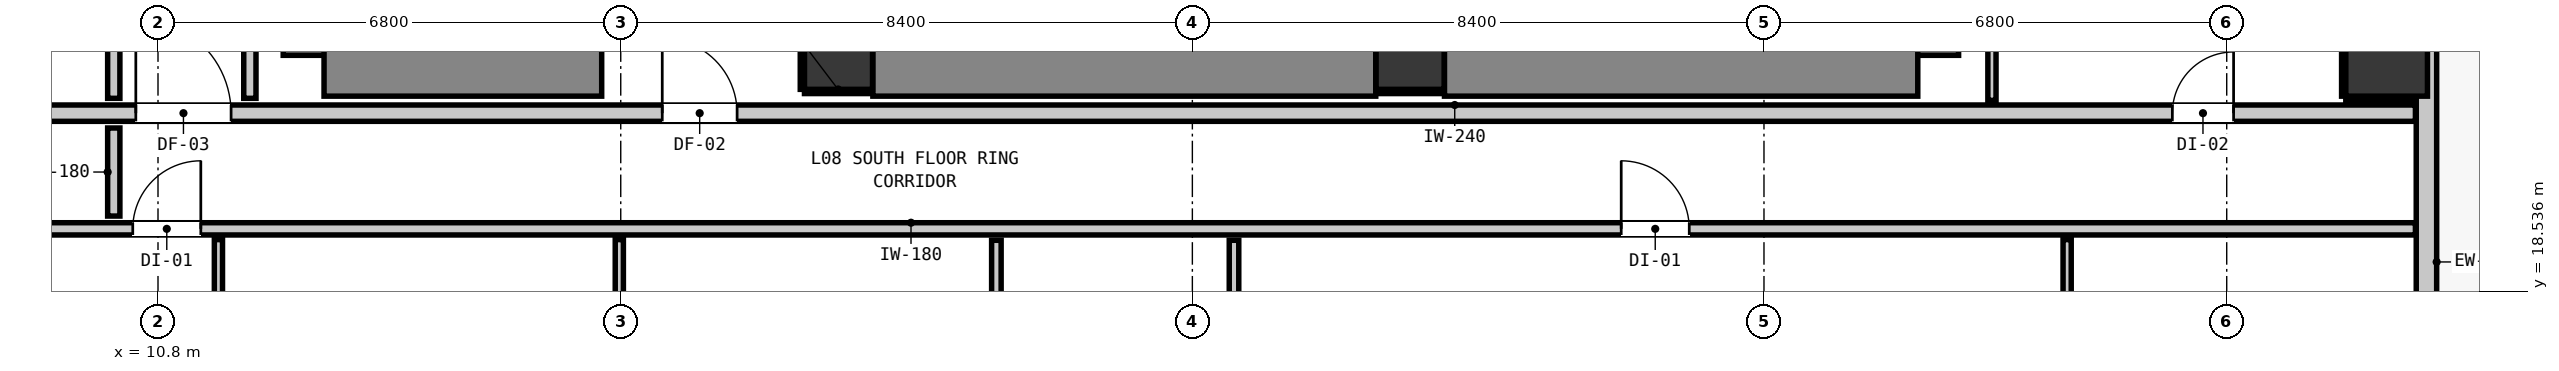
"""IFC4 building model, lengths in metres.
Left out: names, types, materials, properties, quantities, classifications, styles, units other than length and angle.
Written with IfcOpenShell. Run it as: python <this file> out.ifc"""

import sys

from ifc_helpers import new_model, si_unit, direction, frame, frame_2d, origin, origin_2d, place, context, subcontext, project, spatial, rectangle, extrude, element, fill, save


model = new_model("IFC4")
c1 = context("Model", 3, precision=1e-05, world=origin(), true_north=direction((0.0, 1.0)))
c2 = subcontext(c1, "Body", "Model", "MODEL_VIEW")
j1 = project(units=[si_unit("LENGTHUNIT", "METRE"), si_unit("PLANEANGLEUNIT", "RADIAN")], contexts=[c1])
p1 = place(None, origin())
s1 = spatial("IfcSite", under=j1, at=p1, CompositionType="ELEMENT")
p2 = place(p1, origin())
s2 = spatial("IfcBuilding", under=s1, at=p2, CompositionType="ELEMENT")
p3 = place(p2, frame((0.0, 0.0, 31.96)))
s3 = spatial("IfcBuildingStorey", under=s2, at=p3, CompositionType="ELEMENT", Elevation=31.96)
for number, where, z_axis, x_axis in (
    (1, (20.8, 22.0, 0.0), (0.0, 0.0, 1.0), (1.0, 0.0, 0.0)),
    (2, (29.2, 22.0, 0.0), (0.0, 0.0, 1.0), (1.0, 0.0, 0.0)),
):
    element("IfcColumn", number, at=place(p3, frame(where, z_axis=z_axis, x_axis=x_axis)), inside=s3, PredefinedType="COLUMN", context=c2, shape_type="SweptSolid", body=[
        extrude(rectangle(XDim=1.0, YDim=1.0, at=origin_2d()), origin(), (0.0, 0.0, 1.0), 3.32),
    ])
p4 = place(p3, frame((13.24, 22.0, 0.0), z_axis=(0.0, 0.0, 1.0), x_axis=(0.0, 1.0, 0.0)))
e3 = element("IfcWall", 3, at=p4, inside=s3, PredefinedType="SHEAR", context=c2, shape_type="SweptSolid", body=[
    extrude(rectangle(XDim=8.195, YDim=1.2, at=frame_2d((4.098, 0.0))), origin(), (0.0, 0.0, 1.0), 3.32),
])
p5 = place(p3, frame((13.24, 22.0, 0.0), z_axis=(0.0, 0.0, 1.0), x_axis=(1.0, 0.0, 0.0)))
e4 = element("IfcWall", 4, at=p5, inside=s3, PredefinedType="SHEAR", context=c2, shape_type="SweptSolid", body=[
    extrude(rectangle(XDim=4.08, YDim=1.2, at=frame_2d((2.04, 0.0))), origin(), (0.0, 0.0, 1.0), 3.32),
])
p6 = place(p3, frame((36.66, 22.0, 0.0), z_axis=(0.0, 0.0, 1.0), x_axis=(0.0, 1.0, 0.0)))
e5 = element("IfcWall", 5, at=p6, inside=s3, PredefinedType="SHEAR", context=c2, shape_type="SweptSolid", body=[
    extrude(rectangle(XDim=8.195, YDim=1.2, at=frame_2d((4.098, 0.0))), origin(), (0.0, 0.0, 1.0), 3.32),
])
p7 = place(p3, frame((29.705, 22.0, 0.0), z_axis=(0.0, 0.0, 1.0), x_axis=(1.0, 0.0, 0.0)))
e6 = element("IfcWall", 6, at=p7, inside=s3, PredefinedType="SHEAR", context=c2, shape_type="SweptSolid", body=[
    extrude(rectangle(XDim=6.955, YDim=1.2, at=frame_2d((3.478, 0.0))), origin(), (0.0, 0.0, 1.0), 3.32),
])
p8 = place(p3, frame((21.305, 22.0, 0.0), z_axis=(0.0, 0.0, 1.0), x_axis=(1.0, 0.0, 0.0)))
e7 = element("IfcWall", 7, at=p8, inside=s3, PredefinedType="SHEAR", context=c2, shape_type="SweptSolid", body=[
    extrude(rectangle(XDim=7.39, YDim=1.2, at=frame_2d((3.695, 0.0))), origin(), (0.0, 0.0, 1.0), 3.32),
])
p9 = place(p3, frame((43.55, 22.0, 0.0), z_axis=(0.0, 0.0, 1.0), x_axis=(1.0, 0.0, 0.0)))
e8 = element("IfcColumn", 8, at=p9, inside=s3, PredefinedType="COLUMN", context=c2, shape_type="SweptSolid", body=[
    extrude(rectangle(XDim=1.2, YDim=1.2, at=origin_2d()), origin(), (0.0, 0.0, 1.0), 3.32),
])
p10 = place(p3, frame((44.135, 44.835, 0.0), z_axis=(0.0, 0.0, 1.0), x_axis=(0.0, -1.0, 0.0)))
e9 = element("IfcWall", 9, at=p10, inside=s3, PredefinedType="STANDARD", context=c2, shape_type="SweptSolid", body=[
    extrude(rectangle(XDim=34.67, YDim=0.3, at=frame_2d((17.335, 0.0))), origin(), (0.0, 0.0, 1.0), 3.06),
])
p11 = place(p10, frame((1.251, 0.0, 0.0)))
e10 = element("IfcOpeningElement", 10, at=p11, cuts=e9, PredefinedType="OPENING", context=c2, shape_type="SweptSolid", body=[
    extrude(rectangle(XDim=1.0, YDim=2.15, at=frame_2d((0.5, 1.075))), frame((0.0, 0.16, 0.0), z_axis=(0.0, -1.0, 0.0), x_axis=(1.0, 0.0, 0.0)), (0.0, 0.0, 1.0), 0.32),
])
p12 = place(p10, frame((32.583, 0.0, 0.85)))
e11 = element("IfcOpeningElement", 11, at=p12, cuts=e9, PredefinedType="OPENING", context=c2, shape_type="SweptSolid", body=[
    extrude(rectangle(XDim=1.35, YDim=1.85, at=frame_2d((0.675, 0.925))), frame((0.0, 0.16, 0.0), z_axis=(0.0, -1.0, 0.0), x_axis=(1.0, 0.0, 0.0)), (0.0, 0.0, 1.0), 0.32),
])
p13 = place(p10, frame((17.81, 0.0, 0.85)))
e12 = element("IfcOpeningElement", 12, at=p13, cuts=e9, PredefinedType="OPENING", context=c2, shape_type="SweptSolid", body=[
    extrude(rectangle(XDim=1.35, YDim=1.85, at=frame_2d((0.675, 0.925))), frame((0.0, 0.16, 0.0), z_axis=(0.0, -1.0, 0.0), x_axis=(1.0, 0.0, 0.0)), (0.0, 0.0, 1.0), 0.32),
])
p14 = place(p10, frame((6.834, 0.0, 0.85)))
e13 = element("IfcOpeningElement", 13, at=p14, cuts=e9, PredefinedType="OPENING", context=c2, shape_type="SweptSolid", body=[
    extrude(rectangle(XDim=1.35, YDim=1.85, at=frame_2d((0.675, 0.925))), frame((0.0, 0.16, 0.0), z_axis=(0.0, -1.0, 0.0), x_axis=(1.0, 0.0, 0.0)), (0.0, 0.0, 1.0), 0.32),
])
p15 = place(p3, frame((1.827, 21.15, 0.0), z_axis=(0.0, 0.0, 1.0), x_axis=(1.0, 0.0, 0.0)))
e14 = element("IfcWall", 14, at=p15, inside=s3, PredefinedType="PARTITIONING", context=c2, shape_type="SweptSolid", body=[
    extrude(rectangle(XDim=42.146, YDim=0.24, at=frame_2d((21.073, 0.0))), origin(), (0.0, 0.0, 1.0), 3.06),
])
p16 = place(p15, frame((16.383, 0.0, 0.0)))
e15 = element("IfcOpeningElement", 15, at=p16, cuts=e14, PredefinedType="OPENING", context=c2, shape_type="SweptSolid", body=[
    extrude(rectangle(XDim=1.1, YDim=2.15, at=frame_2d((0.55, 1.075))), frame((0.0, 0.13, 0.0), z_axis=(0.0, -1.0, 0.0), x_axis=(1.0, 0.0, 0.0)), (0.0, 0.0, 1.0), 0.26),
])
p17 = place(p15, frame((8.647, 0.0, 0.0)))
e16 = element("IfcOpeningElement", 16, at=p17, cuts=e14, PredefinedType="OPENING", context=c2, shape_type="SweptSolid", body=[
    extrude(rectangle(XDim=1.4, YDim=2.15, at=frame_2d((0.7, 1.075))), frame((0.0, 0.13, 0.0), z_axis=(0.0, -1.0, 0.0), x_axis=(1.0, 0.0, 0.0)), (0.0, 0.0, 1.0), 0.26),
])
p18 = place(p15, frame((38.574, 0.0, 0.0)))
e17 = element("IfcOpeningElement", 17, at=p18, cuts=e14, PredefinedType="OPENING", context=c2, shape_type="SweptSolid", body=[
    extrude(rectangle(XDim=0.9, YDim=2.1, at=frame_2d((0.45, 1.05))), frame((0.0, 0.13, 0.0), z_axis=(0.0, -1.0, 0.0), x_axis=(1.0, 0.0, 0.0)), (0.0, 0.0, 1.0), 0.26),
])
p19 = place(p3, frame((1.827, 19.45, 0.0), z_axis=(0.0, 0.0, 1.0), x_axis=(1.0, 0.0, 0.0)))
e18 = element("IfcWall", 18, at=p19, inside=s3, PredefinedType="PARTITIONING", context=c2, shape_type="SweptSolid", body=[
    extrude(rectangle(XDim=42.146, YDim=0.18, at=frame_2d((21.073, 0.0))), origin(), (0.0, 0.0, 1.0), 3.06),
])
p20 = place(p19, frame((8.602, 0.0, 0.0)))
e19 = element("IfcOpeningElement", 19, at=p20, cuts=e18, PredefinedType="OPENING", context=c2, shape_type="SweptSolid", body=[
    extrude(rectangle(XDim=1.0, YDim=2.15, at=frame_2d((0.5, 1.075))), frame((0.0, 0.1, 0.0), z_axis=(0.0, -1.0, 0.0), x_axis=(1.0, 0.0, 0.0)), (0.0, 0.0, 1.0), 0.2),
])
p21 = place(p19, frame((30.475, 0.0, 0.0)))
e20 = element("IfcOpeningElement", 20, at=p21, cuts=e18, PredefinedType="OPENING", context=c2, shape_type="SweptSolid", body=[
    extrude(rectangle(XDim=1.0, YDim=2.15, at=frame_2d((0.5, 1.075))), frame((0.0, 0.1, 0.0), z_axis=(0.0, -1.0, 0.0), x_axis=(1.0, 0.0, 0.0)), (0.0, 0.0, 1.0), 0.2),
])
p22 = place(p3, frame((10.15, 19.638, 0.0), z_axis=(0.0, 0.0, 1.0), x_axis=(0.0, 1.0, 0.0)))
e21 = element("IfcWall", 21, at=p22, inside=s3, PredefinedType="PARTITIONING", context=c2, shape_type="SweptSolid", body=[
    extrude(rectangle(XDim=1.294, YDim=0.18, at=frame_2d((0.647, 0.0))), origin(), (0.0, 0.0, 1.0), 3.06),
])
p23 = place(p3, frame((10.15, 21.368, 0.0), z_axis=(0.0, 0.0, 1.0), x_axis=(0.0, 1.0, 0.0)))
e22 = element("IfcWall", 22, at=p23, inside=s3, PredefinedType="PARTITIONING", context=c2, shape_type="SweptSolid", body=[
    extrude(rectangle(XDim=5.354, YDim=0.18, at=frame_2d((2.677, 0.0))), origin(), (0.0, 0.0, 1.0), 3.06),
])
p24 = place(p3, frame((12.15, 21.368, 0.0), z_axis=(0.0, 0.0, 1.0), x_axis=(0.0, 1.0, 0.0)))
e23 = element("IfcWall", 23, at=p24, inside=s3, PredefinedType="PARTITIONING", context=c2, shape_type="SweptSolid", body=[
    extrude(rectangle(XDim=18.694, YDim=0.18, at=frame_2d((9.347, 0.0))), origin(), (0.0, 0.0, 1.0), 3.06),
])
p25 = place(p3, frame((23.12, 13.148, 0.0), z_axis=(0.0, 0.0, 1.0), x_axis=(0.0, 1.0, 0.0)))
e24 = element("IfcWall", 24, at=p25, inside=s3, PredefinedType="PARTITIONING", context=c2, shape_type="SweptSolid", body=[
    extrude(rectangle(XDim=6.134, YDim=0.14, at=frame_2d((3.067, 0.0))), origin(), (0.0, 0.0, 1.0), 3.06),
])
p26 = place(p3, frame((26.612, 13.148, 0.0), z_axis=(0.0, 0.0, 1.0), x_axis=(0.0, 1.0, 0.0)))
e25 = element("IfcWall", 25, at=p26, inside=s3, PredefinedType="PARTITIONING", context=c2, shape_type="SweptSolid", body=[
    extrude(rectangle(XDim=6.134, YDim=0.14, at=frame_2d((3.067, 0.0))), origin(), (0.0, 0.0, 1.0), 3.06),
])
p27 = place(p26, frame((2.647, 0.0, 0.0)))
e26 = element("IfcOpeningElement", 26, at=p27, cuts=e25, PredefinedType="OPENING", context=c2, shape_type="SweptSolid", body=[
    extrude(rectangle(XDim=0.86, YDim=2.02, at=frame_2d((0.43, 1.01))), frame((0.0, 0.08, 0.0), z_axis=(0.0, -1.0, 0.0), x_axis=(1.0, 0.0, 0.0)), (0.0, 0.0, 1.0), 0.16),
])
p28 = place(p3, frame((11.688, 13.138, 0.0), z_axis=(0.0, 0.0, 1.0), x_axis=(0.0, 1.0, 0.0)))
e27 = element("IfcWall", 27, at=p28, inside=s3, PredefinedType="PARTITIONING", context=c2, shape_type="SweptSolid", body=[
    extrude(rectangle(XDim=6.154, YDim=0.12, at=frame_2d((3.077, 0.0))), origin(), (0.0, 0.0, 1.0), 3.06),
])
p29 = place(p28, frame((2.624, 0.0, 0.0)))
e28 = element("IfcOpeningElement", 28, at=p29, cuts=e27, PredefinedType="OPENING", context=c2, shape_type="SweptSolid", body=[
    extrude(rectangle(XDim=0.9, YDim=2.1, at=frame_2d((0.45, 1.05))), frame((0.0, 0.07, 0.0), z_axis=(0.0, -1.0, 0.0), x_axis=(1.0, 0.0, 0.0)), (0.0, 0.0, 1.0), 0.14),
])
p30 = place(p3, frame((17.579, 13.138, 0.0), z_axis=(0.0, 0.0, 1.0), x_axis=(0.0, 1.0, 0.0)))
e29 = element("IfcWall", 29, at=p30, inside=s3, PredefinedType="PARTITIONING", context=c2, shape_type="SweptSolid", body=[
    extrude(rectangle(XDim=6.154, YDim=0.12, at=frame_2d((3.077, 0.0))), origin(), (0.0, 0.0, 1.0), 3.06),
])
p31 = place(p30, frame((2.637, 0.0, 0.0)))
e30 = element("IfcOpeningElement", 30, at=p31, cuts=e29, PredefinedType="OPENING", context=c2, shape_type="SweptSolid", body=[
    extrude(rectangle(XDim=0.9, YDim=2.1, at=frame_2d((0.45, 1.05))), frame((0.0, 0.07, 0.0), z_axis=(0.0, -1.0, 0.0), x_axis=(1.0, 0.0, 0.0)), (0.0, 0.0, 1.0), 0.14),
])
p32 = place(p3, frame((37.75, 21.338, 0.0), z_axis=(0.0, 0.0, 1.0), x_axis=(0.0, 1.0, 0.0)))
e31 = element("IfcWall", 31, at=p32, inside=s3, PredefinedType="PARTITIONING", context=c2, shape_type="SweptSolid", body=[
    extrude(rectangle(XDim=10.124, YDim=0.12, at=frame_2d((5.062, 0.0))), origin(), (0.0, 0.0, 1.0), 3.06),
])
p33 = place(p3, frame((38.855, 13.138, 0.0), z_axis=(0.0, 0.0, 1.0), x_axis=(0.0, 1.0, 0.0)))
e32 = element("IfcWall", 32, at=p33, inside=s3, PredefinedType="PARTITIONING", context=c2, shape_type="SweptSolid", body=[
    extrude(rectangle(XDim=6.154, YDim=0.12, at=frame_2d((3.077, 0.0))), origin(), (0.0, 0.0, 1.0), 2.445),
])
p34 = place(p33, frame((2.637, 0.0, 0.0)))
e33 = element("IfcOpeningElement", 33, at=p34, cuts=e32, PredefinedType="OPENING", context=c2, shape_type="SweptSolid", body=[
    extrude(rectangle(XDim=0.9, YDim=2.1, at=frame_2d((0.45, 1.05))), frame((0.0, 0.07, 0.0), z_axis=(0.0, -1.0, 0.0), x_axis=(1.0, 0.0, 0.0)), (0.0, 0.0, 1.0), 0.14),
])
p35 = place(p3, frame((20.3, 21.468, 0.0), z_axis=(0.0, 0.0, 1.0), x_axis=(1.0, 0.0, 0.0)))
e34 = element("IfcWall", 34, at=p35, inside=s3, PredefinedType="PARTITIONING", context=c2, shape_type="SweptSolid", body=[
    extrude(rectangle(XDim=0.99, YDim=0.06, at=frame_2d((0.495, 0.0))), origin(), (0.0, 0.0, 1.0), 1.45),
])
p36 = place(p3, frame((20.268, 21.5, 0.0), z_axis=(0.0, 0.0, 1.0), x_axis=(0.0, 1.0, 0.0)))
e35 = element("IfcWall", 35, at=p36, inside=s3, PredefinedType="PARTITIONING", context=c2, shape_type="SweptSolid", body=[
    extrude(rectangle(XDim=1.0, YDim=0.06, at=frame_2d((0.5, 0.0))), origin(), (0.0, 0.0, 1.0), 1.45),
])
p37 = place(p3, frame((28.71, 21.468, 0.0), z_axis=(0.0, 0.0, 1.0), x_axis=(1.0, 0.0, 0.0)))
e36 = element("IfcWall", 36, at=p37, inside=s3, PredefinedType="PARTITIONING", context=c2, shape_type="SweptSolid", body=[
    extrude(rectangle(XDim=0.98, YDim=0.06, at=frame_2d((0.49, 0.0))), origin(), (0.0, 0.0, 1.0), 1.45),
])
p38 = place(p3, frame((42.95, 21.368, 0.0), z_axis=(0.0, 0.0, 1.0), x_axis=(1.0, 0.0, 0.0)))
e37 = element("IfcWall", 37, at=p38, inside=s3, PredefinedType="PARTITIONING", context=c2, shape_type="SweptSolid", body=[
    extrude(rectangle(XDim=1.02, YDim=0.06, at=frame_2d((0.51, 0.0))), origin(), (0.0, 0.0, 1.0), 1.45),
])
p39 = place(p3, frame((42.918, 21.4, 0.0), z_axis=(0.0, 0.0, 1.0), x_axis=(0.0, 1.0, 0.0)))
e38 = element("IfcWall", 38, at=p39, inside=s3, PredefinedType="PARTITIONING", context=c2, shape_type="SweptSolid", body=[
    extrude(rectangle(XDim=1.2, YDim=0.06, at=frame_2d((0.6, 0.0))), origin(), (0.0, 0.0, 1.0), 1.45),
])
p40 = place(p16, origin())
e39 = element("IfcDoor", 39, at=p40, inside=s3, OperationType="SINGLE_SWING_LEFT", PredefinedType="DOOR", context=c2, shape_type="SweptSolid", body=[
    extrude(rectangle(XDim=1.1, YDim=2.15, at=frame_2d((0.55, 1.075))), frame((0.0, 0.025, 0.0), z_axis=(0.0, -1.0, 0.0), x_axis=(1.0, 0.0, 0.0)), (0.0, 0.0, 1.0), 0.05),
])
fill(e15, e39)
p41 = place(p17, origin())
e40 = element("IfcDoor", 40, at=p41, inside=s3, OperationType="SINGLE_SWING_LEFT", PredefinedType="DOOR", context=c2, shape_type="SweptSolid", body=[
    extrude(rectangle(XDim=1.4, YDim=2.15, at=frame_2d((0.7, 1.075))), frame((0.0, 0.025, 0.0), z_axis=(0.0, -1.0, 0.0), x_axis=(1.0, 0.0, 0.0)), (0.0, 0.0, 1.0), 0.05),
])
fill(e16, e40)
p42 = place(p20, origin())
e41 = element("IfcDoor", 41, at=p42, inside=s3, OperationType="SINGLE_SWING_RIGHT", PredefinedType="DOOR", context=c2, shape_type="SweptSolid", body=[
    extrude(rectangle(XDim=1.0, YDim=2.15, at=frame_2d((0.5, 1.075))), frame((0.0, 0.025, 0.0), z_axis=(0.0, -1.0, 0.0), x_axis=(1.0, 0.0, 0.0)), (0.0, 0.0, 1.0), 0.05),
])
fill(e19, e41)
p43 = place(p21, origin())
e42 = element("IfcDoor", 42, at=p43, inside=s3, OperationType="SINGLE_SWING_LEFT", PredefinedType="DOOR", context=c2, shape_type="SweptSolid", body=[
    extrude(rectangle(XDim=1.0, YDim=2.15, at=frame_2d((0.5, 1.075))), frame((0.0, 0.025, 0.0), z_axis=(0.0, -1.0, 0.0), x_axis=(1.0, 0.0, 0.0)), (0.0, 0.0, 1.0), 0.05),
])
fill(e20, e42)
p44 = place(p18, origin())
e43 = element("IfcDoor", 43, at=p44, inside=s3, OperationType="SINGLE_SWING_RIGHT", PredefinedType="DOOR", context=c2, shape_type="SweptSolid", body=[
    extrude(rectangle(XDim=0.9, YDim=2.1, at=frame_2d((0.45, 1.05))), frame((0.0, 0.025, 0.0), z_axis=(0.0, -1.0, 0.0), x_axis=(1.0, 0.0, 0.0)), (0.0, 0.0, 1.0), 0.05),
])
fill(e17, e43)
save(model, sys.argv[1])
